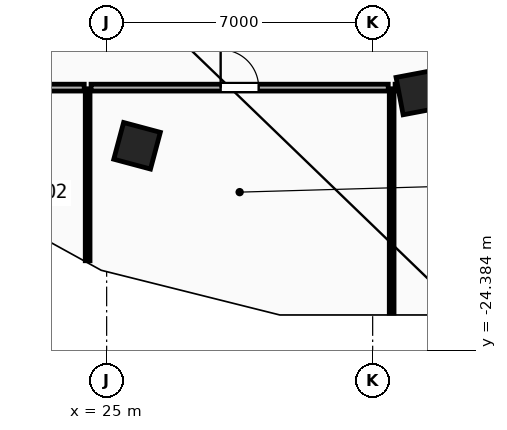
"""IFC4 building model, lengths in metres.
Left out: names, types, materials, properties, quantities, classifications, styles, units other than length and angle.
Written with IfcOpenShell. Run it as: python <this file> out.ifc"""

import sys

from ifc_helpers import new_model, si_unit, direction, frame, frame_2d, origin, origin_2d, place, context, subcontext, project, spatial, rectangle, extrude, element, fill, save


model = new_model("IFC4")
c1 = context("Model", 3, precision=1e-05, world=origin(), true_north=direction((0.0, 1.0)))
c2 = subcontext(c1, "Body", "Model", "MODEL_VIEW")
j1 = project(units=[si_unit("LENGTHUNIT", "METRE"), si_unit("PLANEANGLEUNIT", "RADIAN")], contexts=[c1])
p1 = place(None, origin())
s1 = spatial("IfcSite", under=j1, at=p1, CompositionType="ELEMENT")
p2 = place(p1, origin())
s2 = spatial("IfcBuilding", under=s1, at=p2, CompositionType="ELEMENT")
p3 = place(p2, frame((0.0, 0.0, 169.2)))
s3 = spatial("IfcBuildingStorey", under=s2, at=p3, CompositionType="ELEMENT", Elevation=169.2)
for number, where, z_axis, x_axis in (
    (1, (25.8, -19.0, 0.0), (0.0, 0.0, 1.0), (0.966, -0.259, 0.0)),
    (2, (33.2, -17.6, 0.0), (0.0, 0.0, 1.0), (0.983, 0.186, 0.0)),
):
    element("IfcColumn", number, at=place(p3, frame(where, z_axis=z_axis, x_axis=x_axis)), inside=s3, PredefinedType="COLUMN", context=c2, shape_type="SweptSolid", body=[
        extrude(rectangle(XDim=1.0, YDim=1.0, at=origin_2d()), origin(), (0.0, 0.0, 1.0), 3.6),
    ])
p4 = place(p3, frame((24.5, -22.025, 0.0), z_axis=(0.0, 0.0, 1.0), x_axis=(0.0, 1.0, 0.0)))
e3 = element("IfcWall", 3, at=p4, inside=s3, PredefinedType="PARTITIONING", context=c2, shape_type="SweptSolid", body=[
    extrude(rectangle(XDim=4.525, YDim=0.125, at=frame_2d((2.263, 0.0))), origin(), (0.0, 0.0, 1.0), 3.36),
])
p5 = place(p3, frame((32.5, -23.402, 0.0), z_axis=(0.0, 0.0, 1.0), x_axis=(0.0, 1.0, 0.0)))
e4 = element("IfcWall", 4, at=p5, inside=s3, PredefinedType="PARTITIONING", context=c2, shape_type="SweptSolid", body=[
    extrude(rectangle(XDim=5.902, YDim=0.125, at=frame_2d((2.951, 0.0))), origin(), (0.0, 0.0, 1.0), 3.36),
])
p6 = place(p3, frame((24.59, -17.47, 0.0), z_axis=(0.0, 0.0, 1.0), x_axis=(1.0, 0.0, 0.0)))
e5 = element("IfcWall", 5, at=p6, inside=s3, PredefinedType="PARTITIONING", context=c2, shape_type="SweptSolid", body=[
    extrude(rectangle(XDim=7.82, YDim=0.18, at=frame_2d((3.91, 0.0))), origin(), (0.0, 0.0, 1.0), 3.36),
])
p7 = place(p6, frame((3.41, 0.0, 0.0)))
e6 = element("IfcOpeningElement", 6, at=p7, cuts=e5, PredefinedType="OPENING", context=c2, shape_type="SweptSolid", body=[
    extrude(rectangle(XDim=1.0, YDim=2.15, at=frame_2d((0.5, 1.075))), frame((0.0, 0.1, 0.0), z_axis=(0.0, -1.0, 0.0), x_axis=(1.0, 0.0, 0.0)), (0.0, 0.0, 1.0), 0.2),
])
p8 = place(p3, frame((18.342, -17.47, 0.0), z_axis=(0.0, 0.0, 1.0), x_axis=(1.0, 0.0, 0.0)))
e7 = element("IfcWall", 7, at=p8, inside=s3, PredefinedType="PARTITIONING", context=c2, shape_type="SweptSolid", body=[
    extrude(rectangle(XDim=6.068, YDim=0.18, at=frame_2d((3.034, 0.0))), origin(), (0.0, 0.0, 1.0), 3.36),
])
p9 = place(p8, frame((2.534, 0.0, 0.0)))
e8 = element("IfcOpeningElement", 8, at=p9, cuts=e7, PredefinedType="OPENING", context=c2, shape_type="SweptSolid", body=[
    extrude(rectangle(XDim=1.0, YDim=2.15, at=frame_2d((0.5, 1.075))), frame((0.0, 0.1, 0.0), z_axis=(0.0, -1.0, 0.0), x_axis=(1.0, 0.0, 0.0)), (0.0, 0.0, 1.0), 0.2),
])
p10 = place(p3, frame((32.59, -17.47, 0.0), z_axis=(0.0, 0.0, 1.0), x_axis=(1.0, 0.0, 0.0)))
e9 = element("IfcWall", 9, at=p10, inside=s3, PredefinedType="PARTITIONING", context=c2, shape_type="SweptSolid", body=[
    extrude(rectangle(XDim=1.038, YDim=0.18, at=frame_2d((0.519, 0.0))), origin(), (0.0, 0.0, 1.0), 3.36),
])
p11 = place(p7, origin())
e10 = element("IfcDoor", 10, at=p11, inside=s3, OperationType="SINGLE_SWING_LEFT", PredefinedType="DOOR", context=c2, shape_type="SweptSolid", body=[
    extrude(rectangle(XDim=1.0, YDim=2.15, at=frame_2d((0.5, 1.075))), frame((0.0, 0.025, 0.0), z_axis=(0.0, -1.0, 0.0), x_axis=(1.0, 0.0, 0.0)), (0.0, 0.0, 1.0), 0.05),
])
fill(e6, e10)
save(model, sys.argv[1])
